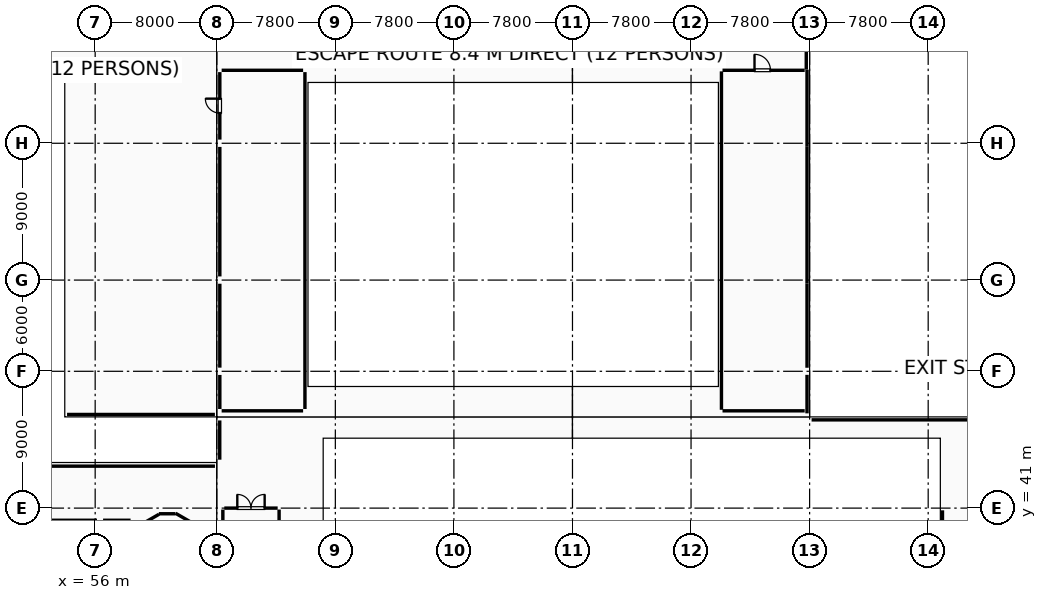
"""IFC4 building model, lengths in metres.
Left out: names, types, materials, properties, quantities, classifications, styles, units other than length and angle.
Written with IfcOpenShell. Run it as: python <this file> out.ifc"""

import sys

from ifc_helpers import new_model, si_unit, direction, frame, frame_2d, origin, origin_2d, place, context, subcontext, project, spatial, rectangle, hollow_rectangle, i_section, extrude, element, fill, save


model = new_model("IFC4")
c1 = context("Model", 3, precision=1e-05, world=origin(), true_north=direction((0.0, 1.0)))
c2 = subcontext(c1, "Body", "Model", "MODEL_VIEW")
j1 = project(units=[si_unit("LENGTHUNIT", "METRE"), si_unit("PLANEANGLEUNIT", "RADIAN")], contexts=[c1])
p1 = place(None, origin())
s1 = spatial("IfcSite", under=j1, at=p1, CompositionType="ELEMENT")
p2 = place(p1, origin())
s2 = spatial("IfcBuilding", under=s1, at=p2, CompositionType="ELEMENT")
p3 = place(p2, frame((0.0, 0.0, 15.0)))
s3 = spatial("IfcBuildingStorey", under=s2, at=p3, CompositionType="ELEMENT", Elevation=15.0)
p4 = place(p3, frame((56.0, 41.0, 0.0), z_axis=(0.0, 0.0, 1.0), x_axis=(1.0, 0.0, 0.0)))
e1 = element("IfcColumn", 1, at=p4, inside=s3, PredefinedType="COLUMN", context=c2, shape_type="SweptSolid", body=[
    extrude(rectangle(XDim=0.75, YDim=0.75, at=origin_2d()), origin(), (0.0, 0.0, 1.0), 4.76),
])
for number, where, z_axis, x_axis in (
    (2, (56.0, 50.0, 0.0), (0.0, 0.0, 1.0), (1.0, 0.0, 0.0)),
    (3, (56.0, 56.0, 0.0), (0.0, 0.0, 1.0), (1.0, 0.0, 0.0)),
    (4, (56.0, 65.0, 0.0), (0.0, 0.0, 1.0), (1.0, 0.0, 0.0)),
):
    element("IfcColumn", number, at=place(p3, frame(where, z_axis=z_axis, x_axis=x_axis)), inside=s3, PredefinedType="COLUMN", context=c2, shape_type="SweptSolid", body=[
        extrude(rectangle(XDim=0.9, YDim=0.9, at=origin_2d()), origin(), (0.0, 0.0, 1.0), 4.8),
    ])
p5 = place(p3, frame((64.0, 50.0, 0.0), z_axis=(0.0, 0.0, 1.0), x_axis=(1.0, 0.0, 0.0)))
e5 = element("IfcColumn", 5, at=p5, inside=s3, PredefinedType="COLUMN", context=c2, shape_type="SweptSolid", body=[
    extrude(hollow_rectangle(XDim=0.45, YDim=0.45, WallThickness=0.02, at=origin_2d()), origin(), (0.0, 0.0, 1.0), 4.8),
])
for number, where, z_axis, x_axis in (
    (6, (64.0, 56.0, 0.0), (0.0, 0.0, 1.0), (1.0, 0.0, 0.0)),
    (7, (64.0, 65.0, 0.0), (0.0, 0.0, 1.0), (1.0, 0.0, 0.0)),
):
    element("IfcColumn", number, at=place(p3, frame(where, z_axis=z_axis, x_axis=x_axis)), inside=s3, PredefinedType="COLUMN", context=c2, shape_type="SweptSolid", body=[
        extrude(i_section(OverallWidth=0.25, OverallDepth=0.45, WebThickness=0.011, FlangeThickness=0.014, FilletRadius=0.015, at=origin_2d()), origin(), (0.0, 0.0, 1.0), 4.8),
    ])
p6 = place(p3, frame((103.0, 50.0, 0.0), z_axis=(0.0, 0.0, 1.0), x_axis=(1.0, 0.0, 0.0)))
e8 = element("IfcColumn", 8, at=p6, inside=s3, PredefinedType="COLUMN", context=c2, shape_type="SweptSolid", body=[
    extrude(hollow_rectangle(XDim=0.45, YDim=0.45, WallThickness=0.02, at=origin_2d()), origin(), (0.0, 0.0, 1.0), 4.8),
])
for number, where, z_axis, x_axis in (
    (9, (103.0, 56.0, 0.0), (0.0, 0.0, 1.0), (1.0, 0.0, 0.0)),
    (10, (103.0, 65.0, 0.0), (0.0, 0.0, 1.0), (1.0, 0.0, 0.0)),
):
    element("IfcColumn", number, at=place(p3, frame(where, z_axis=z_axis, x_axis=x_axis)), inside=s3, PredefinedType="COLUMN", context=c2, shape_type="SweptSolid", body=[
        extrude(i_section(OverallWidth=0.25, OverallDepth=0.45, WebThickness=0.011, FlangeThickness=0.014, FilletRadius=0.015, at=origin_2d()), origin(), (0.0, 0.0, 1.0), 4.8),
    ])
for number, where, z_axis, x_axis in (
    (11, (110.8, 50.0, 0.0), (0.0, 0.0, 1.0), (1.0, 0.0, 0.0)),
    (12, (110.8, 56.0, 0.0), (0.0, 0.0, 1.0), (1.0, 0.0, 0.0)),
):
    element("IfcColumn", number, at=place(p3, frame(where, z_axis=z_axis, x_axis=x_axis)), inside=s3, PredefinedType="COLUMN", context=c2, shape_type="SweptSolid", body=[
        extrude(rectangle(XDim=0.9, YDim=0.9, at=origin_2d()), origin(), (0.0, 0.0, 1.0), 4.8),
    ])
for number, where, z_axis, x_axis in (
    (13, (64.0, 47.0, 0.0), (0.0, 0.0, 1.0), (1.0, 0.0, 0.0)),
    (14, (71.8, 47.0, 0.0), (0.0, 0.0, 1.0), (1.0, 0.0, 0.0)),
    (15, (79.6, 47.0, 0.0), (0.0, 0.0, 1.0), (1.0, 0.0, 0.0)),
    (16, (87.4, 47.0, 0.0), (0.0, 0.0, 1.0), (1.0, 0.0, 0.0)),
    (17, (95.2, 47.0, 0.0), (0.0, 0.0, 1.0), (1.0, 0.0, 0.0)),
    (18, (103.0, 47.0, 0.0), (0.0, 0.0, 1.0), (1.0, 0.0, 0.0)),
):
    element("IfcColumn", number, at=place(p3, frame(where, z_axis=z_axis, x_axis=x_axis)), inside=s3, PredefinedType="COLUMN", context=c2, shape_type="SweptSolid", body=[
        extrude(i_section(OverallWidth=0.25, OverallDepth=0.45, WebThickness=0.011, FlangeThickness=0.014, FilletRadius=0.015, at=origin_2d()), origin(), (0.0, 0.0, 1.0), 4.8),
    ])
p7 = place(p3, frame((70.0, 41.0, 0.0), z_axis=(0.0, 0.0, 1.0), x_axis=(1.0, 0.0, 0.0)))
e19 = element("IfcColumn", 19, at=p7, inside=s3, PredefinedType="COLUMN", context=c2, shape_type="SweptSolid", body=[
    extrude(rectangle(XDim=1.2, YDim=1.2, at=origin_2d()), origin(), (0.0, 0.0, 1.0), 4.8),
])
for number, where, z_axis, x_axis in (
    (20, (79.6, 41.0, 0.0), (0.0, 0.0, 1.0), (1.0, 0.0, 0.0)),
    (21, (87.4, 41.0, 0.0), (0.0, 0.0, 1.0), (1.0, 0.0, 0.0)),
    (22, (95.2, 41.0, 0.0), (0.0, 0.0, 1.0), (1.0, 0.0, 0.0)),
    (23, (103.0, 41.0, 0.0), (0.0, 0.0, 1.0), (1.0, 0.0, 0.0)),
):
    element("IfcColumn", number, at=place(p3, frame(where, z_axis=z_axis, x_axis=x_axis)), inside=s3, PredefinedType="COLUMN", context=c2, shape_type="SweptSolid", body=[
        extrude(rectangle(XDim=1.05, YDim=1.05, at=origin_2d()), origin(), (0.0, 0.0, 1.0), 4.8),
    ])
p8 = place(p3, frame((112.6, 41.0, 0.0), z_axis=(0.0, 0.0, 1.0), x_axis=(1.0, 0.0, 0.0)))
e24 = element("IfcColumn", 24, at=p8, inside=s3, PredefinedType="COLUMN", context=c2, shape_type="SweptSolid", body=[
    extrude(rectangle(XDim=1.2, YDim=1.2, at=origin_2d()), origin(), (0.0, 0.0, 1.0), 4.8),
])
p9 = place(p3, frame((102.78, 73.767, 0.0), z_axis=(0.0, 0.0, 1.0), x_axis=(0.0, -1.0, 0.0)))
e25 = element("IfcWall", 25, at=p9, inside=s3, PredefinedType="STANDARD", context=c2, shape_type="SweptSolid", body=[
    extrude(rectangle(XDim=3.923, YDim=0.4, at=frame_2d((1.961, 0.0))), origin(), (0.0, 0.0, 1.0), 3.785),
])
p10 = place(p3, frame((102.83, 69.84, 0.0), z_axis=(0.0, 0.0, 1.0), x_axis=(0.0, -1.0, 0.0)))
e26 = element("IfcWall", 26, at=p10, inside=s3, PredefinedType="STANDARD", context=c2, shape_type="SweptSolid", body=[
    extrude(rectangle(XDim=5.073, YDim=0.3, at=frame_2d((2.537, 0.0))), origin(), (0.0, 0.0, 1.0), 3.785),
])
p11 = place(p3, frame((102.83, 64.767, 0.0), z_axis=(0.0, 0.0, 1.0), x_axis=(0.0, -1.0, 0.0)))
e27 = element("IfcWall", 27, at=p11, inside=s3, PredefinedType="STANDARD", context=c2, shape_type="SweptSolid", body=[
    extrude(rectangle(XDim=9.0, YDim=0.3, at=frame_2d((4.5, 0.0))), origin(), (0.0, 0.0, 1.0), 3.685),
])
p12 = place(p3, frame((102.83, 55.767, 0.0), z_axis=(0.0, 0.0, 1.0), x_axis=(0.0, -1.0, 0.0)))
e28 = element("IfcWall", 28, at=p12, inside=s3, PredefinedType="STANDARD", context=c2, shape_type="SweptSolid", body=[
    extrude(rectangle(XDim=5.534, YDim=0.3, at=frame_2d((2.767, 0.0))), origin(), (0.0, 0.0, 1.0), 3.535),
])
p13 = place(p3, frame((102.83, 49.767, 0.0), z_axis=(0.0, 0.0, 1.0), x_axis=(0.0, -1.0, 0.0)))
e29 = element("IfcWall", 29, at=p13, inside=s3, PredefinedType="STANDARD", context=c2, shape_type="SweptSolid", body=[
    extrude(rectangle(XDim=2.534, YDim=0.3, at=frame_2d((1.267, 0.0))), origin(), (0.0, 0.0, 1.0), 4.085),
])
p14 = place(p3, frame((103.129, 46.805, 0.0), z_axis=(0.0, 0.0, 1.0), x_axis=(1.0, 0.0, 0.0)))
e30 = element("IfcWall", 30, at=p14, inside=s3, PredefinedType="STANDARD", context=c2, shape_type="SweptSolid", body=[
    extrude(rectangle(XDim=15.286, YDim=0.35, at=frame_2d((7.643, 0.0))), origin(), (0.0, 0.0, 1.0), 3.735),
])
p15 = place(p3, frame((40.12, 43.76, 0.0), z_axis=(0.0, 0.0, 1.0), x_axis=(1.0, 0.0, 0.0)))
e31 = element("IfcWall", 31, at=p15, inside=s3, PredefinedType="PARAPET", context=c2, shape_type="SweptSolid", body=[
    extrude(rectangle(XDim=23.76, YDim=0.18, at=frame_2d((11.88, 0.0))), origin(), (0.0, 0.0, 1.0), 0.88),
])
p16 = place(p3, frame((64.195, 44.185, 0.0), z_axis=(0.0, 0.0, 1.0), x_axis=(0.0, 1.0, 0.0)))
e32 = element("IfcWall", 32, at=p16, inside=s3, PredefinedType="STANDARD", context=c2, shape_type="SweptSolid", body=[
    extrude(rectangle(XDim=2.582, YDim=0.35, at=frame_2d((1.291, 0.0))), origin(), (0.0, 0.0, 1.0), 3.735),
])
p17 = place(p3, frame((63.876, 47.16, 0.0), z_axis=(0.0, 0.0, 1.0), x_axis=(-1.0, 0.0, 0.0)))
e33 = element("IfcWall", 33, at=p17, inside=s3, PredefinedType="STANDARD", context=c2, shape_type="SweptSolid", body=[
    extrude(rectangle(XDim=9.726, YDim=0.28, at=frame_2d((4.863, 0.0))), origin(), (0.0, 0.0, 1.0), 4.55),
])
p18 = place(p17, frame((3.976, 0.0, 0.95)))
e34 = element("IfcOpeningElement", 34, at=p18, cuts=e33, PredefinedType="OPENING", context=c2, shape_type="SweptSolid", body=[
    extrude(rectangle(XDim=1.8, YDim=1.8, at=frame_2d((0.9, 0.9))), frame((0.0, 0.15, 0.0), z_axis=(0.0, -1.0, 0.0), x_axis=(1.0, 0.0, 0.0)), (0.0, 0.0, 1.0), 0.3),
])
p19 = place(p3, frame((62.861, 39.086, 0.0), z_axis=(0.0, 0.0, 1.0), x_axis=(-0.499930512259, 0.866065518833, 0.0)))
e35 = element("IfcWall", 35, at=p19, inside=s3, PredefinedType="SHEAR", context=c2, shape_type="SweptSolid", body=[
    extrude(rectangle(XDim=1.219, YDim=0.35, at=frame_2d((0.609, 0.0))), origin(), (0.0, 0.0, 1.0), 4.58),
])
for number, where, z_axis, x_axis in (
    (36, (62.233, 40.115, 0.0), (0.0, 0.0, 1.0), (-0.866, 0.5, 0.0)),
    (37, (61.283, 40.628, 0.0), (0.0, 0.0, 1.0), (-1.0, 0.0, 0.0)),
    (38, (60.205, 40.598, 0.0), (0.0, 0.0, 1.0), (-0.866, -0.5, 0.0)),
):
    element("IfcWall", number, at=place(p3, frame(where, z_axis=z_axis, x_axis=x_axis)), inside=s3, PredefinedType="SHEAR", context=c2, shape_type="SweptSolid", body=[
        extrude(rectangle(XDim=1.093, YDim=0.35, at=frame_2d((0.546, 0.0))), origin(), (0.0, 0.0, 1.0), 4.58),
    ])
p20 = place(p3, frame((111.74, 21.345, 0.0), z_axis=(0.0, 0.0, 1.0), x_axis=(0.0, 1.0, 0.0)))
e39 = element("IfcWall", 39, at=p20, inside=s3, PredefinedType="PARTITIONING", context=c2, shape_type="SweptSolid", body=[
    extrude(rectangle(XDim=19.51, YDim=0.25, at=frame_2d((9.755, 0.0))), origin(), (0.0, 0.0, 1.0), 4.54),
])
p21 = place(p3, frame((68.1, 40.905, 0.0), z_axis=(0.0, 0.0, 1.0), x_axis=(0.0, -1.0, 0.0)))
e40 = element("IfcWall", 40, at=p21, inside=s3, PredefinedType="PARTITIONING", context=c2, shape_type="SweptSolid", body=[
    extrude(rectangle(XDim=24.61, YDim=0.15, at=frame_2d((12.305, 0.0))), origin(), (0.0, 0.0, 1.0), 4.54),
])
p22 = place(p21, frame((11.83, 0.0, 0.0)))
e41 = element("IfcOpeningElement", 41, at=p22, cuts=e40, PredefinedType="OPENING", context=c2, shape_type="SweptSolid", body=[
    extrude(rectangle(XDim=0.95, YDim=2.15, at=frame_2d((0.475, 1.075))), frame((0.0, 0.085, 0.0), z_axis=(0.0, -1.0, 0.0), x_axis=(1.0, 0.0, 0.0)), (0.0, 0.0, 1.0), 0.17),
])
p23 = place(p3, frame((64.4, 16.295, 0.0), z_axis=(0.0, 0.0, 1.0), x_axis=(0.0, 1.0, 0.0)))
e42 = element("IfcWall", 42, at=p23, inside=s3, PredefinedType="PARTITIONING", context=c2, shape_type="SweptSolid", body=[
    extrude(rectangle(XDim=24.61, YDim=0.15, at=frame_2d((12.305, 0.0))), origin(), (0.0, 0.0, 1.0), 3.73),
])
p24 = place(p3, frame((64.495, 41.0, 0.0), z_axis=(0.0, 0.0, 1.0), x_axis=(1.0, 0.0, 0.0)))
e43 = element("IfcWall", 43, at=p24, inside=s3, PredefinedType="PARTITIONING", context=c2, shape_type="SweptSolid", body=[
    extrude(rectangle(XDim=3.51, YDim=0.15, at=frame_2d((1.755, 0.0))), origin(), (0.0, 0.0, 1.0), 3.98),
])
p25 = place(p24, frame((0.855, 0.0, 0.0)))
e44 = element("IfcOpeningElement", 44, at=p25, cuts=e43, PredefinedType="OPENING", context=c2, shape_type="SweptSolid", body=[
    extrude(rectangle(XDim=1.8, YDim=2.15, at=frame_2d((0.9, 1.075))), frame((0.0, 0.085, 0.0), z_axis=(0.0, -1.0, 0.0), x_axis=(1.0, 0.0, 0.0)), (0.0, 0.0, 1.0), 0.17),
])
p26 = place(p3, frame((56.52, 40.2, 0.0), z_axis=(0.0, 0.0, 1.0), x_axis=(1.0, 0.0, 0.0)))
e45 = element("IfcWall", 45, at=p26, inside=s3, PredefinedType="PARTITIONING", context=c2, shape_type="SweptSolid", body=[
    extrude(rectangle(XDim=1.81, YDim=0.2, at=frame_2d((0.905, 0.0))), origin(), (0.0, 0.0, 1.0), 4.57),
])
p27 = place(p3, frame((64.32, 69.8, 0.0), z_axis=(0.0, 0.0, 1.0), x_axis=(1.0, 0.0, 0.0)))
e46 = element("IfcWall", 46, at=p27, inside=s3, PredefinedType="PARTITIONING", context=c2, shape_type="SweptSolid", body=[
    extrude(rectangle(XDim=5.36, YDim=0.2, at=frame_2d((2.68, 0.0))), origin(), (0.0, 0.0, 1.0), 4.54),
])
p28 = place(p3, frame((69.8, 69.68, 0.0), z_axis=(0.0, 0.0, 1.0), x_axis=(0.0, -1.0, 0.0)))
e47 = element("IfcWall", 47, at=p28, inside=s3, PredefinedType="PARTITIONING", context=c2, shape_type="SweptSolid", body=[
    extrude(rectangle(XDim=22.16, YDim=0.2, at=frame_2d((11.08, 0.0))), origin(), (0.0, 0.0, 1.0), 4.54),
])
p29 = place(p3, frame((69.68, 47.4, 0.0), z_axis=(0.0, 0.0, 1.0), x_axis=(-1.0, 0.0, 0.0)))
e48 = element("IfcWall", 48, at=p29, inside=s3, PredefinedType="PARTITIONING", context=c2, shape_type="SweptSolid", body=[
    extrude(rectangle(XDim=5.36, YDim=0.2, at=frame_2d((2.68, 0.0))), origin(), (0.0, 0.0, 1.0), 3.73),
])
p30 = place(p3, frame((64.2, 47.52, 0.0), z_axis=(0.0, 0.0, 1.0), x_axis=(0.0, 1.0, 0.0)))
e49 = element("IfcWall", 49, at=p30, inside=s3, PredefinedType="PARTITIONING", context=c2, shape_type="SweptSolid", body=[
    extrude(rectangle(XDim=2.24, YDim=0.2, at=frame_2d((1.12, 0.0))), origin(), (0.0, 0.0, 1.0), 3.53),
])
p31 = place(p3, frame((64.2, 50.24, 0.0), z_axis=(0.0, 0.0, 1.0), x_axis=(0.0, 1.0, 0.0)))
e50 = element("IfcWall", 50, at=p31, inside=s3, PredefinedType="PARTITIONING", context=c2, shape_type="SweptSolid", body=[
    extrude(rectangle(XDim=5.52, YDim=0.2, at=frame_2d((2.76, 0.0))), origin(), (0.0, 0.0, 1.0), 3.68),
])
p32 = place(p3, frame((64.2, 56.24, 0.0), z_axis=(0.0, 0.0, 1.0), x_axis=(0.0, 1.0, 0.0)))
e51 = element("IfcWall", 51, at=p32, inside=s3, PredefinedType="PARTITIONING", context=c2, shape_type="SweptSolid", body=[
    extrude(rectangle(XDim=8.52, YDim=0.2, at=frame_2d((4.26, 0.0))), origin(), (0.0, 0.0, 1.0), 3.78),
])
p33 = place(p3, frame((64.2, 65.24, 0.0), z_axis=(0.0, 0.0, 1.0), x_axis=(0.0, 1.0, 0.0)))
e52 = element("IfcWall", 52, at=p33, inside=s3, PredefinedType="PARTITIONING", context=c2, shape_type="SweptSolid", body=[
    extrude(rectangle(XDim=4.44, YDim=0.2, at=frame_2d((2.22, 0.0))), origin(), (0.0, 0.0, 1.0), 3.88),
])
p34 = place(p33, frame((1.745, 0.0, 0.0)))
e53 = element("IfcOpeningElement", 53, at=p34, cuts=e52, PredefinedType="OPENING", context=c2, shape_type="SweptSolid", body=[
    extrude(rectangle(XDim=0.95, YDim=2.15, at=frame_2d((0.475, 1.075))), frame((0.0, 0.11, 0.0), z_axis=(0.0, -1.0, 0.0), x_axis=(1.0, 0.0, 0.0)), (0.0, 0.0, 1.0), 0.22),
])
p35 = place(p3, frame((97.27, 69.8, 0.0), z_axis=(0.0, 0.0, 1.0), x_axis=(1.0, 0.0, 0.0)))
e54 = element("IfcWall", 54, at=p35, inside=s3, PredefinedType="PARTITIONING", context=c2, shape_type="SweptSolid", body=[
    extrude(rectangle(XDim=5.406, YDim=0.1, at=frame_2d((2.703, 0.0))), origin(), (0.0, 0.0, 1.0), 4.54),
])
p36 = place(p35, frame((2.105, 0.0, 0.0)))
e55 = element("IfcOpeningElement", 55, at=p36, cuts=e54, PredefinedType="OPENING", context=c2, shape_type="SweptSolid", body=[
    extrude(rectangle(XDim=1.05, YDim=2.15, at=frame_2d((0.525, 1.075))), frame((0.0, 0.06, 0.0), z_axis=(0.0, -1.0, 0.0), x_axis=(1.0, 0.0, 0.0)), (0.0, 0.0, 1.0), 0.12),
])
p37 = place(p3, frame((102.676, 47.4, 0.0), z_axis=(0.0, 0.0, 1.0), x_axis=(-1.0, 0.0, 0.0)))
e56 = element("IfcWall", 56, at=p37, inside=s3, PredefinedType="PARTITIONING", context=c2, shape_type="SweptSolid", body=[
    extrude(rectangle(XDim=5.406, YDim=0.1, at=frame_2d((2.703, 0.0))), origin(), (0.0, 0.0, 1.0), 3.73),
])
p38 = place(p3, frame((97.2, 47.47, 0.0), z_axis=(0.0, 0.0, 1.0), x_axis=(0.0, 1.0, 0.0)))
e57 = element("IfcWall", 57, at=p38, inside=s3, PredefinedType="PARTITIONING", context=c2, shape_type="SweptSolid", body=[
    extrude(rectangle(XDim=22.26, YDim=0.1, at=frame_2d((11.13, 0.0))), origin(), (0.0, 0.0, 1.0), 4.54),
])
p39 = place(p3, frame((48.48, 40.2, 0.0), z_axis=(0.0, 0.0, 1.0), x_axis=(1.0, 0.0, 0.0)))
e58 = element("IfcWall", 58, at=p39, inside=s3, PredefinedType="PARTITIONING", context=c2, shape_type="SweptSolid", body=[
    extrude(rectangle(XDim=7.64, YDim=0.12, at=frame_2d((3.82, 0.0))), origin(), (0.0, 0.0, 1.0), 4.57),
])
p40 = place(p18, origin())
e59 = element("IfcWindow", 59, at=p40, inside=s3, PartitioningType="SINGLE_PANEL", PredefinedType="WINDOW", context=c2, shape_type="SweptSolid", body=[
    extrude(rectangle(XDim=1.8, YDim=1.8, at=frame_2d((0.9, 0.9))), frame((0.0, 0.03, 0.0), z_axis=(0.0, -1.0, 0.0), x_axis=(1.0, 0.0, 0.0)), (0.0, 0.0, 1.0), 0.06),
])
fill(e34, e59)
p41 = place(p34, origin())
e60 = element("IfcDoor", 60, at=p41, inside=s3, OperationType="SINGLE_SWING_RIGHT", PredefinedType="DOOR", context=c2, shape_type="SweptSolid", body=[
    extrude(rectangle(XDim=0.95, YDim=2.15, at=frame_2d((0.475, 1.075))), frame((0.0, 0.025, 0.0), z_axis=(0.0, -1.0, 0.0), x_axis=(1.0, 0.0, 0.0)), (0.0, 0.0, 1.0), 0.05),
])
fill(e53, e60)
p42 = place(p36, origin())
e61 = element("IfcDoor", 61, at=p42, inside=s3, OperationType="SINGLE_SWING_LEFT", PredefinedType="DOOR", context=c2, shape_type="SweptSolid", body=[
    extrude(rectangle(XDim=1.05, YDim=2.15, at=frame_2d((0.525, 1.075))), frame((0.0, 0.025, 0.0), z_axis=(0.0, -1.0, 0.0), x_axis=(1.0, 0.0, 0.0)), (0.0, 0.0, 1.0), 0.05),
])
fill(e55, e61)
p43 = place(p25, origin())
e62 = element("IfcDoor", 62, at=p43, inside=s3, OperationType="DOUBLE_DOOR_SINGLE_SWING", PredefinedType="DOOR", context=c2, shape_type="SweptSolid", body=[
    extrude(rectangle(XDim=1.8, YDim=2.15, at=frame_2d((0.9, 1.075))), frame((0.0, 0.025, 0.0), z_axis=(0.0, -1.0, 0.0), x_axis=(1.0, 0.0, 0.0)), (0.0, 0.0, 1.0), 0.05),
])
fill(e44, e62)
save(model, sys.argv[1])
